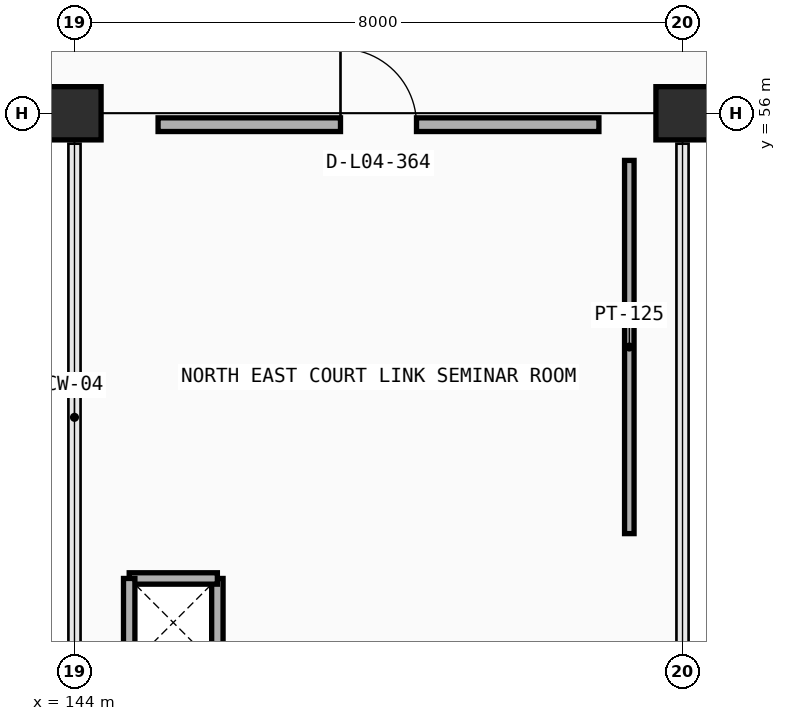
"""IFC4 building model, lengths in metres.
Left out: names, types, materials, properties, quantities, classifications, styles, units other than length and angle.
Written with IfcOpenShell. Run it as: python <this file> out.ifc"""

import sys

from ifc_helpers import new_model, si_unit, direction, frame, frame_2d, origin, origin_2d, place, context, subcontext, project, spatial, rectangle, extrude, element, fill, save


model = new_model("IFC4")
c1 = context("Model", 3, precision=1e-05, world=origin(), true_north=direction((0.0, 1.0)))
c2 = subcontext(c1, "Body", "Model", "MODEL_VIEW")
j1 = project(units=[si_unit("LENGTHUNIT", "METRE"), si_unit("PLANEANGLEUNIT", "RADIAN")], contexts=[c1])
p1 = place(None, origin())
s1 = spatial("IfcSite", under=j1, at=p1, CompositionType="ELEMENT")
p2 = place(p1, origin())
s2 = spatial("IfcBuilding", under=s1, at=p2, CompositionType="ELEMENT")
p3 = place(p2, frame((0.0, 0.0, 13.8)))
s3 = spatial("IfcBuildingStorey", under=s2, at=p3, CompositionType="ELEMENT", Elevation=13.8)
for number, where, z_axis, x_axis in (
    (1, (144.0, 56.0, 0.0), (0.0, 0.0, 1.0), (1.0, 0.0, 0.0)),
    (2, (152.0, 56.0, 0.0), (0.0, 0.0, 1.0), (1.0, 0.0, 0.0)),
):
    element("IfcColumn", number, at=place(p3, frame(where, z_axis=z_axis, x_axis=x_axis)), inside=s3, PredefinedType="COLUMN", context=c2, shape_type="SweptSolid", body=[
        extrude(rectangle(XDim=0.7, YDim=0.7, at=origin_2d()), origin(), (0.0, 0.0, 1.0), 4.2),
    ])
for number, where, z_axis, x_axis in (
    (3, (145.88, 48.72, 0.0), (0.0, 0.0, 1.0), (0.0, 1.0, 0.0)),
    (4, (145.88, 49.88, 0.0), (0.0, 0.0, 1.0), (-1.0, 0.0, 0.0)),
    (5, (144.72, 49.88, 0.0), (0.0, 0.0, 1.0), (0.0, -1.0, 0.0)),
):
    element("IfcWall", number, at=place(p3, frame(where, z_axis=z_axis, x_axis=x_axis)), inside=s3, PredefinedType="PARTITIONING", context=c2, shape_type="SweptSolid", body=[
        extrude(rectangle(XDim=1.16, YDim=0.15, at=frame_2d((0.58, 0.0))), origin(), (0.0, 0.0, 1.0), 3.9),
    ])
p4 = place(p3, frame((145.1, 55.85, 0.0), z_axis=(0.0, 0.0, 1.0), x_axis=(1.0, 0.0, 0.0)))
e6 = element("IfcWall", 6, at=p4, inside=s3, PredefinedType="PARTITIONING", context=c2, shape_type="SweptSolid", body=[
    extrude(rectangle(XDim=5.8, YDim=0.18, at=frame_2d((2.9, 0.0))), origin(), (0.0, 0.0, 1.0), 3.3),
])
p5 = place(p4, frame((2.4, 0.0, 0.0)))
e7 = element("IfcOpeningElement", 7, at=p5, cuts=e6, PredefinedType="OPENING", context=c2, shape_type="SweptSolid", body=[
    extrude(rectangle(XDim=1.0, YDim=2.15, at=frame_2d((0.5, 1.075))), frame((0.0, 0.1, 0.0), z_axis=(0.0, -1.0, 0.0), x_axis=(1.0, 0.0, 0.0)), (0.0, 0.0, 1.0), 0.2),
])
p6 = place(p3, frame((151.3, 50.47, 0.0), z_axis=(0.0, 0.0, 1.0), x_axis=(0.0, 1.0, 0.0)))
e8 = element("IfcWall", 8, at=p6, inside=s3, PredefinedType="PARTITIONING", context=c2, shape_type="SweptSolid", body=[
    extrude(rectangle(XDim=4.91, YDim=0.125, at=frame_2d((2.455, 0.0))), origin(), (0.0, 0.0, 1.0), 3.3),
])
p7 = place(p5, origin())
e9 = element("IfcDoor", 9, at=p7, inside=s3, OperationType="SINGLE_SWING_LEFT", PredefinedType="DOOR", context=c2, shape_type="SweptSolid", body=[
    extrude(rectangle(XDim=1.0, YDim=2.15, at=frame_2d((0.5, 1.075))), frame((0.0, 0.025, 0.0), z_axis=(0.0, -1.0, 0.0), x_axis=(1.0, 0.0, 0.0)), (0.0, 0.0, 1.0), 0.05),
])
fill(e7, e9)
save(model, sys.argv[1])
